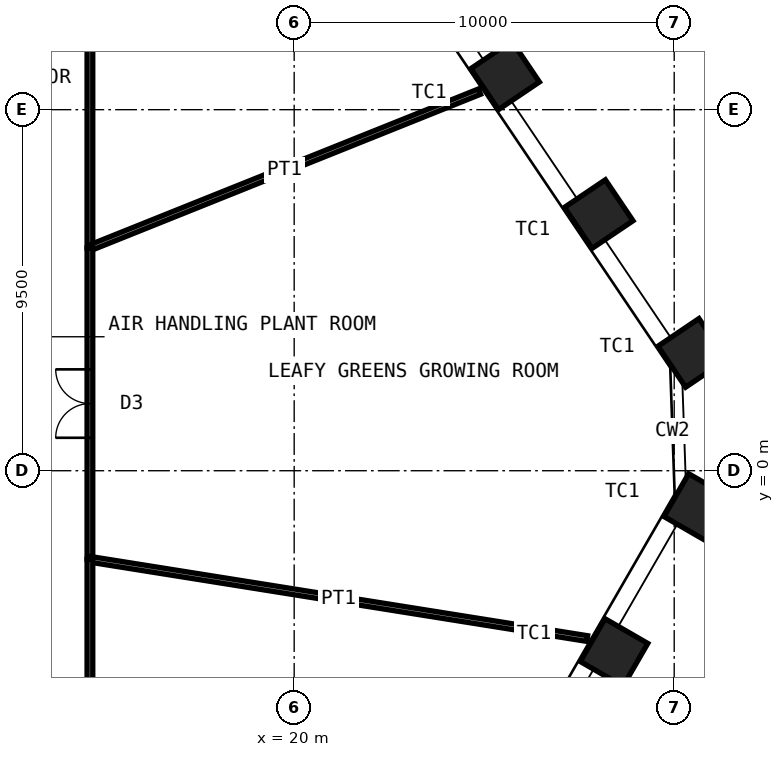
"""IFC4 building model, lengths in metres.
Left out: names, types, materials, properties, quantities, classifications, styles, units other than length and angle.
Written with IfcOpenShell. Run it as: python <this file> out.ifc"""

import sys

from ifc_helpers import new_model, si_unit, direction, frame, frame_2d, origin, origin_2d, place, context, subcontext, project, spatial, rectangle, hollow_rectangle, extrude, element, fill, save


model = new_model("IFC4")
c1 = context("Model", 3, precision=1e-05, world=origin(), true_north=direction((0.0, 1.0)))
c2 = subcontext(c1, "Body", "Model", "MODEL_VIEW")
j1 = project(units=[si_unit("LENGTHUNIT", "METRE"), si_unit("PLANEANGLEUNIT", "RADIAN")], contexts=[c1])
p1 = place(None, origin())
s1 = spatial("IfcSite", under=j1, at=p1, CompositionType="ELEMENT")
p2 = place(p1, origin())
s2 = spatial("IfcBuilding", under=s1, at=p2, CompositionType="ELEMENT")
p3 = place(p2, frame((0.0, 0.0, 37.0)))
s3 = spatial("IfcBuildingStorey", under=s2, at=p3, CompositionType="ELEMENT", Elevation=37.0)
for number, where, z_axis, x_axis in (
    (1, (25.55, 10.404, 0.0), (0.0, 0.0, 1.0), (-0.559, 0.829, 0.0)),
    (2, (28.013, 6.752, 0.0), (0.0, 0.0, 1.0), (-0.559, 0.829, 0.0)),
    (3, (30.476, 3.101, 0.0), (0.0, 0.0, 1.0), (-0.559, 0.829, 0.0)),
    (4, (30.618, -0.967, 0.0), (0.0, 0.0, 1.0), (0.5, 0.866, 0.0)),
    (5, (28.416, -4.782, 0.0), (0.0, 0.0, 1.0), (0.5, 0.866, 0.0)),
):
    element("IfcColumn", number, at=place(p3, frame(where, z_axis=z_axis, x_axis=x_axis)), inside=s3, PredefinedType="COLUMN", context=c2, shape_type="SweptSolid", body=[
        extrude(hollow_rectangle(XDim=1.3, YDim=1.3, WallThickness=0.1, at=origin_2d()), origin(), (0.0, 0.0, 1.0), 5.0),
    ])
p4 = place(p3, frame((14.625, 11.625, 0.0), z_axis=(0.0, 0.0, 1.0), x_axis=(0.0, -1.0, 0.0)))
e6 = element("IfcWall", 6, at=p4, inside=s3, PredefinedType="PARTITIONING", context=c2, shape_type="SweptSolid", body=[
    extrude(rectangle(XDim=5.761, YDim=0.15, at=frame_2d((2.88, 0.0))), origin(), (0.0, 0.0, 1.0), 4.8),
])
p5 = place(p3, frame((24.877, 9.975, 0.0), z_axis=(0.0, 0.0, 1.0), x_axis=(-0.928157765849, -0.372186998288, 0.0)))
e7 = element("IfcWall", 7, at=p5, inside=s3, PredefinedType="PARTITIONING", context=c2, shape_type="SweptSolid", body=[
    extrude(rectangle(XDim=11.046, YDim=0.15, at=frame_2d((5.523, 0.0))), origin(), (0.0, 0.0, 1.0), 3.7),
])
p6 = place(p3, frame((14.625, 5.864, 0.0), z_axis=(0.0, 0.0, 1.0), x_axis=(0.0, -1.0, 0.0)))
e8 = element("IfcWall", 8, at=p6, inside=s3, PredefinedType="PARTITIONING", context=c2, shape_type="SweptSolid", body=[
    extrude(rectangle(XDim=8.195, YDim=0.15, at=frame_2d((4.097, 0.0))), origin(), (0.0, 0.0, 1.0), 4.8),
])
p7 = place(p6, frame((3.198, 0.0, 0.0)))
e9 = element("IfcOpeningElement", 9, at=p7, cuts=e8, PredefinedType="OPENING", context=c2, shape_type="SweptSolid", body=[
    extrude(rectangle(XDim=1.8, YDim=2.4, at=frame_2d((0.9, 1.2))), frame((0.0, 0.085, 0.0), z_axis=(0.0, -1.0, 0.0), x_axis=(1.0, 0.0, 0.0)), (0.0, 0.0, 1.0), 0.17),
])
p8 = place(p3, frame((27.711, -4.416, 0.0), z_axis=(0.0, 0.0, 1.0), x_axis=(-0.987538625309, 0.15737682016, 0.0)))
e10 = element("IfcWall", 10, at=p8, inside=s3, PredefinedType="PARTITIONING", context=c2, shape_type="SweptSolid", body=[
    extrude(rectangle(XDim=13.251, YDim=0.15, at=frame_2d((6.625, 0.0))), origin(), (0.0, 0.0, 1.0), 3.7),
])
p9 = place(p3, frame((14.625, -2.331, 0.0), z_axis=(0.0, 0.0, 1.0), x_axis=(0.0, -1.0, 0.0)))
e11 = element("IfcWall", 11, at=p9, inside=s3, PredefinedType="PARTITIONING", context=c2, shape_type="SweptSolid", body=[
    extrude(rectangle(XDim=8.62, YDim=0.15, at=frame_2d((4.31, 0.0))), origin(), (0.0, 0.0, 1.0), 4.8),
])
p10 = place(p9, frame((3.41, 0.0, 0.0)))
e12 = element("IfcOpeningElement", 12, at=p10, cuts=e11, PredefinedType="OPENING", context=c2, shape_type="SweptSolid", body=[
    extrude(rectangle(XDim=1.8, YDim=2.4, at=frame_2d((0.9, 1.2))), frame((0.0, 0.085, 0.0), z_axis=(0.0, -1.0, 0.0), x_axis=(1.0, 0.0, 0.0)), (0.0, 0.0, 1.0), 0.17),
])
p11 = place(p7, origin())
e13 = element("IfcDoor", 13, at=p11, inside=s3, OperationType="DOUBLE_DOOR_DOUBLE_SWING", PredefinedType="DOOR", context=c2, shape_type="SweptSolid", body=[
    extrude(rectangle(XDim=1.8, YDim=2.4, at=frame_2d((0.9, 1.2))), frame((0.0, 0.025, 0.0), z_axis=(0.0, -1.0, 0.0), x_axis=(1.0, 0.0, 0.0)), (0.0, 0.0, 1.0), 0.05),
])
fill(e9, e13)
save(model, sys.argv[1])
